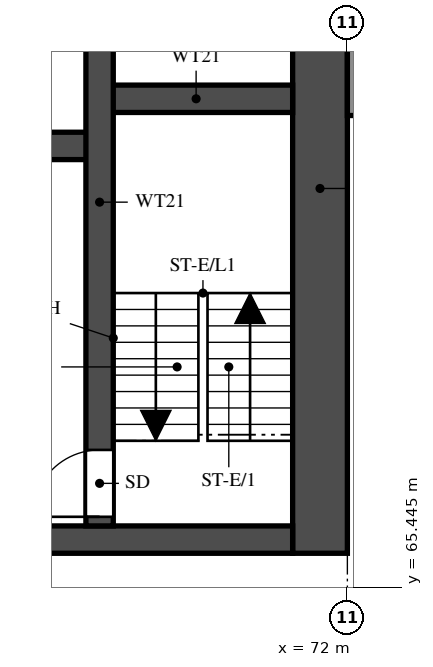
"""IFC4 building model, lengths in metres.
Left out: names, types, materials, properties, quantities, classifications, styles, units other than length and angle.
Written with IfcOpenShell. Run it as: python <this file> out.ifc"""

import sys

from ifc_helpers import new_model, si_unit, direction, frame, frame_2d, origin, place, context, subcontext, project, spatial, rectangle, extrude, element, fill, save


model = new_model("IFC4")
c1 = context("Model", 3, precision=1e-05, world=origin(), true_north=direction((0.0, 1.0)))
c2 = subcontext(c1, "Body", "Model", "MODEL_VIEW")
j1 = project(units=[si_unit("LENGTHUNIT", "METRE"), si_unit("PLANEANGLEUNIT", "RADIAN")], contexts=[c1])
p1 = place(None, origin())
s1 = spatial("IfcSite", under=j1, at=p1, CompositionType="ELEMENT")
p2 = place(p1, origin())
s2 = spatial("IfcBuilding", under=s1, at=p2, CompositionType="ELEMENT")
p3 = place(p2, frame((0.0, 0.0, 83.0)))
s3 = spatial("IfcBuildingStorey", under=s2, at=p3, CompositionType="ELEMENT", Elevation=83.0)
p4 = place(p3, frame((71.55, 66.0, 0.0), z_axis=(0.0, 0.0, 1.0), x_axis=(0.0, 1.0, 0.0)))
e1 = element("IfcWall", 1, at=p4, inside=s3, PredefinedType="SHEAR", context=c2, shape_type="SweptSolid", body=[
    extrude(rectangle(XDim=12.0, YDim=0.9, at=frame_2d((6.0, 0.0))), origin(), (0.0, 0.0, 1.0), 3.18),
])
p5 = place(p3, frame((29.7, 66.225, 0.0), z_axis=(0.0, 0.0, 1.0), x_axis=(1.0, 0.0, 0.0)))
e2 = element("IfcWall", 2, at=p5, inside=s3, PredefinedType="SHEAR", context=c2, shape_type="SweptSolid", body=[
    extrude(rectangle(XDim=41.4, YDim=0.45, at=frame_2d((20.7, 0.0))), origin(), (0.0, 0.0, 1.0), 3.18),
])
p6 = place(p5, frame((0.925, 0.0, 0.0)))
e3 = element("IfcOpeningElement", 3, at=p6, cuts=e2, PredefinedType="OPENING", context=c2, shape_type="SweptSolid", body=[
    extrude(rectangle(XDim=1.1, YDim=2.1, at=frame_2d((0.55, 1.05))), frame((0.0, 0.235, 0.0), z_axis=(0.0, -1.0, 0.0), x_axis=(1.0, 0.0, 0.0)), (0.0, 0.0, 1.0), 0.47),
])
p7 = place(p5, frame((3.738, 0.0, 0.0)))
e4 = element("IfcOpeningElement", 4, at=p7, cuts=e2, PredefinedType="OPENING", context=c2, shape_type="SweptSolid", body=[
    extrude(rectangle(XDim=1.8, YDim=2.1, at=frame_2d((0.9, 1.05))), frame((0.0, 0.235, 0.0), z_axis=(0.0, -1.0, 0.0), x_axis=(1.0, 0.0, 0.0)), (0.0, 0.0, 1.0), 0.47),
])
p8 = place(p3, frame((32.875, 72.7, 0.0), z_axis=(0.0, 0.0, 1.0), x_axis=(1.0, 0.0, 0.0)))
e5 = element("IfcWall", 5, at=p8, inside=s3, PredefinedType="SHEAR", context=c2, shape_type="SweptSolid", body=[
    extrude(rectangle(XDim=35.05, YDim=0.45, at=frame_2d((17.525, 0.0))), origin(), (0.0, 0.0, 1.0), 3.18),
])
p9 = place(p8, frame((19.8, 0.0, 0.0)))
e6 = element("IfcOpeningElement", 6, at=p9, cuts=e5, PredefinedType="OPENING", context=c2, shape_type="SweptSolid", body=[
    extrude(rectangle(XDim=1.1, YDim=2.1, at=frame_2d((0.55, 1.05))), frame((0.0, 0.235, 0.0), z_axis=(0.0, -1.0, 0.0), x_axis=(1.0, 0.0, 0.0)), (0.0, 0.0, 1.0), 0.47),
])
p10 = place(p8, frame((27.65, 0.0, 0.0)))
e7 = element("IfcOpeningElement", 7, at=p10, cuts=e5, PredefinedType="OPENING", context=c2, shape_type="SweptSolid", body=[
    extrude(rectangle(XDim=1.1, YDim=2.1, at=frame_2d((0.55, 1.05))), frame((0.0, 0.235, 0.0), z_axis=(0.0, -1.0, 0.0), x_axis=(1.0, 0.0, 0.0)), (0.0, 0.0, 1.0), 0.47),
])
p11 = place(p8, frame((30.25, 0.0, 0.0)))
e8 = element("IfcOpeningElement", 8, at=p11, cuts=e5, PredefinedType="OPENING", context=c2, shape_type="SweptSolid", body=[
    extrude(rectangle(XDim=1.1, YDim=2.1, at=frame_2d((0.55, 1.05))), frame((0.0, 0.235, 0.0), z_axis=(0.0, -1.0, 0.0), x_axis=(1.0, 0.0, 0.0)), (0.0, 0.0, 1.0), 0.47),
])
p12 = place(p8, frame((3.75, 0.0, 0.0)))
e9 = element("IfcOpeningElement", 9, at=p12, cuts=e5, PredefinedType="OPENING", context=c2, shape_type="SweptSolid", body=[
    extrude(rectangle(XDim=1.1, YDim=2.1, at=frame_2d((0.55, 1.05))), frame((0.0, 0.235, 0.0), z_axis=(0.0, -1.0, 0.0), x_axis=(1.0, 0.0, 0.0)), (0.0, 0.0, 1.0), 0.47),
])
p13 = place(p8, frame((6.5, 0.0, 0.0)))
e10 = element("IfcOpeningElement", 10, at=p13, cuts=e5, PredefinedType="OPENING", context=c2, shape_type="SweptSolid", body=[
    extrude(rectangle(XDim=1.1, YDim=2.1, at=frame_2d((0.55, 1.05))), frame((0.0, 0.235, 0.0), z_axis=(0.0, -1.0, 0.0), x_axis=(1.0, 0.0, 0.0)), (0.0, 0.0, 1.0), 0.47),
])
p14 = place(p8, frame((9.25, 0.0, 0.0)))
e11 = element("IfcOpeningElement", 11, at=p14, cuts=e5, PredefinedType="OPENING", context=c2, shape_type="SweptSolid", body=[
    extrude(rectangle(XDim=1.1, YDim=2.1, at=frame_2d((0.55, 1.05))), frame((0.0, 0.235, 0.0), z_axis=(0.0, -1.0, 0.0), x_axis=(1.0, 0.0, 0.0)), (0.0, 0.0, 1.0), 0.47),
])
p15 = place(p8, frame((12.0, 0.0, 0.0)))
e12 = element("IfcOpeningElement", 12, at=p15, cuts=e5, PredefinedType="OPENING", context=c2, shape_type="SweptSolid", body=[
    extrude(rectangle(XDim=1.1, YDim=2.1, at=frame_2d((0.55, 1.05))), frame((0.0, 0.235, 0.0), z_axis=(0.0, -1.0, 0.0), x_axis=(1.0, 0.0, 0.0)), (0.0, 0.0, 1.0), 0.47),
])
p16 = place(p8, frame((14.75, 0.0, 0.0)))
e13 = element("IfcOpeningElement", 13, at=p16, cuts=e5, PredefinedType="OPENING", context=c2, shape_type="SweptSolid", body=[
    extrude(rectangle(XDim=1.1, YDim=2.1, at=frame_2d((0.55, 1.05))), frame((0.0, 0.235, 0.0), z_axis=(0.0, -1.0, 0.0), x_axis=(1.0, 0.0, 0.0)), (0.0, 0.0, 1.0), 0.47),
])
p17 = place(p8, frame((17.5, 0.0, 0.0)))
e14 = element("IfcOpeningElement", 14, at=p17, cuts=e5, PredefinedType="OPENING", context=c2, shape_type="SweptSolid", body=[
    extrude(rectangle(XDim=1.1, YDim=2.1, at=frame_2d((0.55, 1.05))), frame((0.0, 0.235, 0.0), z_axis=(0.0, -1.0, 0.0), x_axis=(1.0, 0.0, 0.0)), (0.0, 0.0, 1.0), 0.47),
])
p18 = place(p8, frame((0.913, 0.0, 0.0)))
e15 = element("IfcOpeningElement", 15, at=p18, cuts=e5, PredefinedType="OPENING", context=c2, shape_type="SweptSolid", body=[
    extrude(rectangle(XDim=1.1, YDim=2.1, at=frame_2d((0.55, 1.05))), frame((0.0, 0.235, 0.0), z_axis=(0.0, -1.0, 0.0), x_axis=(1.0, 0.0, 0.0)), (0.0, 0.0, 1.0), 0.47),
])
p19 = place(p3, frame((67.925, 73.475, 0.0), z_axis=(0.0, 0.0, 1.0), x_axis=(1.0, 0.0, 0.0)))
e16 = element("IfcWall", 16, at=p19, inside=s3, PredefinedType="SHEAR", context=c2, shape_type="SweptSolid", body=[
    extrude(rectangle(XDim=3.175, YDim=0.45, at=frame_2d((1.587, 0.0))), origin(), (0.0, 0.0, 1.0), 3.18),
])
p20 = place(p3, frame((67.925, 66.45, 0.0), z_axis=(0.0, 0.0, 1.0), x_axis=(0.0, 1.0, 0.0)))
e17 = element("IfcWall", 17, at=p20, inside=s3, PredefinedType="SHEAR", context=c2, shape_type="SweptSolid", body=[
    extrude(rectangle(XDim=10.65, YDim=0.45, at=frame_2d((5.325, 0.0))), origin(), (0.0, 0.0, 1.0), 3.18),
])
p21 = place(p20, frame((0.15, 0.0, 0.0)))
e18 = element("IfcOpeningElement", 18, at=p21, cuts=e17, PredefinedType="OPENING", context=c2, shape_type="SweptSolid", body=[
    extrude(rectangle(XDim=1.1, YDim=2.1, at=frame_2d((0.55, 1.05))), frame((0.0, 0.235, 0.0), z_axis=(0.0, -1.0, 0.0), x_axis=(1.0, 0.0, 0.0)), (0.0, 0.0, 1.0), 0.47),
])
p22 = place(p3, frame((72.1, 73.2, 0.0), z_axis=(0.0, 0.0, 1.0), x_axis=(0.0, 1.0, 0.0)))
e19 = element("IfcWall", 19, at=p22, inside=s3, PredefinedType="SOLIDWALL", context=c2, shape_type="SweptSolid", body=[
    extrude(rectangle(XDim=4.8, YDim=0.2, at=frame_2d((2.4, 0.0))), origin(), (0.0, 0.0, 1.0), 3.18),
])
p23 = place(p21, origin())
e20 = element("IfcDoor", 20, at=p23, inside=s3, OperationType="SINGLE_SWING_LEFT", PredefinedType="DOOR", context=c2, shape_type="SweptSolid", body=[
    extrude(rectangle(XDim=1.1, YDim=2.1, at=frame_2d((0.55, 1.05))), frame((0.0, 0.025, 0.0), z_axis=(0.0, -1.0, 0.0), x_axis=(1.0, 0.0, 0.0)), (0.0, 0.0, 1.0), 0.05),
])
fill(e18, e20)
save(model, sys.argv[1])
